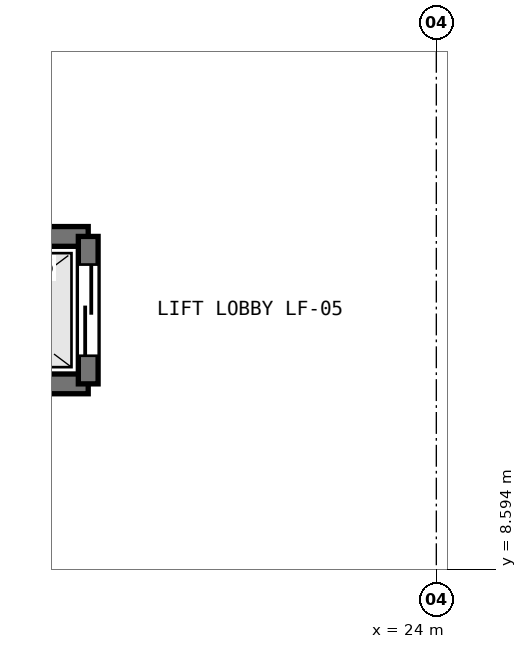
"""IFC4 building model, lengths in metres.
Left out: names, types, materials, properties, quantities, classifications, styles, units other than length and angle.
Written with IfcOpenShell. Run it as: python <this file> out.ifc"""

import sys

from ifc_helpers import new_model, si_unit, direction, frame, frame_2d, origin, place, context, subcontext, project, spatial, rectangle, extrude, element, fill, save


model = new_model("IFC4")
c1 = context("Model", 3, precision=1e-05, world=origin(), true_north=direction((0.0, 1.0)))
c2 = subcontext(c1, "Body", "Model", "MODEL_VIEW")
j1 = project(units=[si_unit("LENGTHUNIT", "METRE"), si_unit("PLANEANGLEUNIT", "RADIAN")], contexts=[c1])
p1 = place(None, origin())
s1 = spatial("IfcSite", under=j1, at=p1, CompositionType="ELEMENT")
p2 = place(p1, origin())
s2 = spatial("IfcBuilding", under=s1, at=p2, CompositionType="ELEMENT")
p3 = place(p2, frame((0.0, 0.0, -4.8)))
s3 = spatial("IfcBuildingStorey", under=s2, at=p3, CompositionType="ELEMENT", Elevation=-4.8)
for number, where, z_axis, x_axis in (
    (1, (16.98, 12.97, 0.0), (0.0, 0.0, 1.0), (1.0, 0.0, 0.0)),
    (2, (19.42, 11.03, 0.0), (0.0, 0.0, 1.0), (-1.0, 0.0, 0.0)),
):
    element("IfcWall", number, at=place(p3, frame(where, z_axis=z_axis, x_axis=x_axis)), inside=s3, PredefinedType="SHEAR", context=c2, shape_type="SweptSolid", body=[
        extrude(rectangle(XDim=2.44, YDim=0.26, at=frame_2d((1.22, 0.0))), origin(), (0.0, 0.0, 1.0), 4.46),
    ])
p4 = place(p3, frame((19.42, 12.97, 0.0), z_axis=(0.0, 0.0, 1.0), x_axis=(0.0, -1.0, 0.0)))
e3 = element("IfcWall", 3, at=p4, inside=s3, PredefinedType="SHEAR", context=c2, shape_type="SweptSolid", body=[
    extrude(rectangle(XDim=1.94, YDim=0.26, at=frame_2d((0.97, 0.0))), origin(), (0.0, 0.0, 1.0), 4.46),
])
p5 = place(p4, frame((0.37, 0.0, 0.0)))
e4 = element("IfcOpeningElement", 4, at=p5, cuts=e3, PredefinedType="OPENING", context=c2, shape_type="SweptSolid", body=[
    extrude(rectangle(XDim=1.2, YDim=2.15, at=frame_2d((0.6, 1.075))), frame((0.0, 0.14, 0.0), z_axis=(0.0, -1.0, 0.0), x_axis=(1.0, 0.0, 0.0)), (0.0, 0.0, 1.0), 0.28),
])
p6 = place(p5, origin())
e5 = element("IfcDoor", 5, at=p6, inside=s3, OperationType="SLIDING_TO_LEFT", PredefinedType="DOOR", context=c2, shape_type="SweptSolid", body=[
    extrude(rectangle(XDim=1.2, YDim=2.15, at=frame_2d((0.6, 1.075))), frame((0.0, 0.025, 0.0), z_axis=(0.0, -1.0, 0.0), x_axis=(1.0, 0.0, 0.0)), (0.0, 0.0, 1.0), 0.05),
])
fill(e4, e5)
save(model, sys.argv[1])
